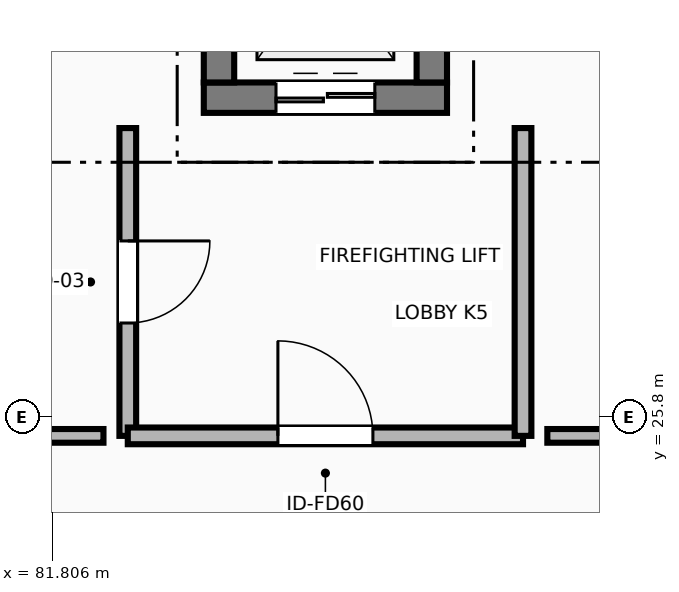
"""IFC4 building model, lengths in metres.
Left out: names, types, materials, properties, quantities, classifications, styles, units other than length and angle.
Written with IfcOpenShell. Run it as: python <this file> out.ifc"""

import sys

from ifc_helpers import new_model, si_unit, direction, frame, frame_2d, origin, place, context, subcontext, project, spatial, rectangle, extrude, element, fill, save


model = new_model("IFC4")
c1 = context("Model", 3, precision=1e-05, world=origin(), true_north=direction((0.0, 1.0)))
c2 = subcontext(c1, "Body", "Model", "MODEL_VIEW")
j1 = project(units=[si_unit("LENGTHUNIT", "METRE"), si_unit("PLANEANGLEUNIT", "RADIAN")], contexts=[c1])
p1 = place(None, origin())
s1 = spatial("IfcSite", under=j1, at=p1, CompositionType="ELEMENT")
p2 = place(p1, origin())
s2 = spatial("IfcBuilding", under=s1, at=p2, CompositionType="ELEMENT")
p3 = place(p2, frame((0.0, 0.0, -4.5)))
s3 = spatial("IfcBuildingStorey", under=s2, at=p3, CompositionType="ELEMENT", Elevation=-4.5)
p4 = place(p3, frame((83.8, 30.0, -0.55), z_axis=(0.0, 0.0, 1.0), x_axis=(1.0, 0.0, 0.0)))
e1 = element("IfcWall", 1, at=p4, inside=s3, PredefinedType="SHEAR", context=c2, shape_type="SweptSolid", body=[
    extrude(rectangle(XDim=3.2, YDim=0.4, at=frame_2d((1.6, 0.0))), origin(), (0.0, 0.0, 1.0), 5.05),
])
p5 = place(p4, frame((0.95, 0.0, 0.55)))
e2 = element("IfcOpeningElement", 2, at=p5, cuts=e1, PredefinedType="OPENING", context=c2, shape_type="SweptSolid", body=[
    extrude(rectangle(XDim=1.3, YDim=2.25, at=frame_2d((0.65, 1.125))), frame((0.0, 0.21, 0.0), z_axis=(0.0, -1.0, 0.0), x_axis=(1.0, 0.0, 0.0)), (0.0, 0.0, 1.0), 0.42),
])
for number, where, z_axis, x_axis in (
    (3, (84.0, 30.2, -0.55), (0.0, 0.0, 1.0), (0.0, 1.0, 0.0)),
    (4, (86.8, 33.3, -0.55), (0.0, 0.0, 1.0), (0.0, -1.0, 0.0)),
):
    element("IfcWall", number, at=place(p3, frame(where, z_axis=z_axis, x_axis=x_axis)), inside=s3, PredefinedType="SHEAR", context=c2, shape_type="SweptSolid", body=[
        extrude(rectangle(XDim=3.1, YDim=0.4, at=frame_2d((1.55, 0.0))), origin(), (0.0, 0.0, 1.0), 5.05),
    ])
p6 = place(p3, frame((82.8, 29.6, 0.0), z_axis=(0.0, 0.0, 1.0), x_axis=(0.0, -1.0, 0.0)))
e5 = element("IfcWall", 5, at=p6, inside=s3, PredefinedType="PARTITIONING", context=c2, shape_type="SweptSolid", body=[
    extrude(rectangle(XDim=4.05, YDim=0.22, at=frame_2d((2.025, 0.0))), origin(), (0.0, 0.0, 1.0), 4.22),
])
p7 = place(p6, frame((1.485, 0.0, 0.0)))
e6 = element("IfcOpeningElement", 6, at=p7, cuts=e5, PredefinedType="OPENING", context=c2, shape_type="SweptSolid", body=[
    extrude(rectangle(XDim=1.08, YDim=2.2, at=frame_2d((0.54, 1.1))), frame((0.0, 0.12, 0.0), z_axis=(0.0, -1.0, 0.0), x_axis=(1.0, 0.0, 0.0)), (0.0, 0.0, 1.0), 0.24),
])
p8 = place(p3, frame((82.8, 25.55, 0.0), z_axis=(0.0, 0.0, 1.0), x_axis=(1.0, 0.0, 0.0)))
e7 = element("IfcWall", 7, at=p8, inside=s3, PredefinedType="PARTITIONING", context=c2, shape_type="SweptSolid", body=[
    extrude(rectangle(XDim=5.2, YDim=0.22, at=frame_2d((2.6, 0.0))), origin(), (0.0, 0.0, 1.0), 3.555),
])
p9 = place(p8, frame((1.975, 0.0, 0.0)))
e8 = element("IfcOpeningElement", 8, at=p9, cuts=e7, PredefinedType="OPENING", context=c2, shape_type="SweptSolid", body=[
    extrude(rectangle(XDim=1.25, YDim=2.2, at=frame_2d((0.625, 1.1))), frame((0.0, 0.12, 0.0), z_axis=(0.0, -1.0, 0.0), x_axis=(1.0, 0.0, 0.0)), (0.0, 0.0, 1.0), 0.24),
])
p10 = place(p3, frame((88.0, 25.55, 0.0), z_axis=(0.0, 0.0, 1.0), x_axis=(0.0, 1.0, 0.0)))
e9 = element("IfcWall", 9, at=p10, inside=s3, PredefinedType="PARTITIONING", context=c2, shape_type="SweptSolid", body=[
    extrude(rectangle(XDim=4.05, YDim=0.22, at=frame_2d((2.025, 0.0))), origin(), (0.0, 0.0, 1.0), 4.22),
])
p11 = place(p3, frame((82.48, 25.55, 0.0), z_axis=(0.0, 0.0, 1.0), x_axis=(-1.0, 0.0, 0.0)))
e10 = element("IfcWall", 10, at=p11, inside=s3, PredefinedType="PARTITIONING", context=c2, shape_type="SweptSolid", body=[
    extrude(rectangle(XDim=1.52, YDim=0.18, at=frame_2d((0.76, 0.0))), origin(), (0.0, 0.0, 1.0), 3.555),
])
p12 = place(p3, frame((90.84, 25.55, 0.0), z_axis=(0.0, 0.0, 1.0), x_axis=(-1.0, 0.0, 0.0)))
e11 = element("IfcWall", 11, at=p12, inside=s3, PredefinedType="PARTITIONING", context=c2, shape_type="SweptSolid", body=[
    extrude(rectangle(XDim=2.52, YDim=0.18, at=frame_2d((1.26, 0.0))), origin(), (0.0, 0.0, 1.0), 3.525),
])
p13 = place(p5, origin())
e12 = element("IfcDoor", 12, at=p13, inside=s3, OperationType="DOUBLE_DOOR_SLIDING", PredefinedType="DOOR", context=c2, shape_type="SweptSolid", body=[
    extrude(rectangle(XDim=1.3, YDim=2.25, at=frame_2d((0.65, 1.125))), frame((0.0, 0.025, 0.0), z_axis=(0.0, -1.0, 0.0), x_axis=(1.0, 0.0, 0.0)), (0.0, 0.0, 1.0), 0.05),
])
fill(e2, e12)
p14 = place(p9, origin())
e13 = element("IfcDoor", 13, at=p14, inside=s3, OperationType="SINGLE_SWING_LEFT", PredefinedType="DOOR", context=c2, shape_type="SweptSolid", body=[
    extrude(rectangle(XDim=1.25, YDim=2.2, at=frame_2d((0.625, 1.1))), frame((0.0, 0.025, 0.0), z_axis=(0.0, -1.0, 0.0), x_axis=(1.0, 0.0, 0.0)), (0.0, 0.0, 1.0), 0.05),
])
fill(e8, e13)
p15 = place(p7, origin())
e14 = element("IfcDoor", 14, at=p15, inside=s3, OperationType="SINGLE_SWING_LEFT", PredefinedType="DOOR", context=c2, shape_type="SweptSolid", body=[
    extrude(rectangle(XDim=1.08, YDim=2.2, at=frame_2d((0.54, 1.1))), frame((0.0, 0.025, 0.0), z_axis=(0.0, -1.0, 0.0), x_axis=(1.0, 0.0, 0.0)), (0.0, 0.0, 1.0), 0.05),
])
fill(e6, e14)
save(model, sys.argv[1])
